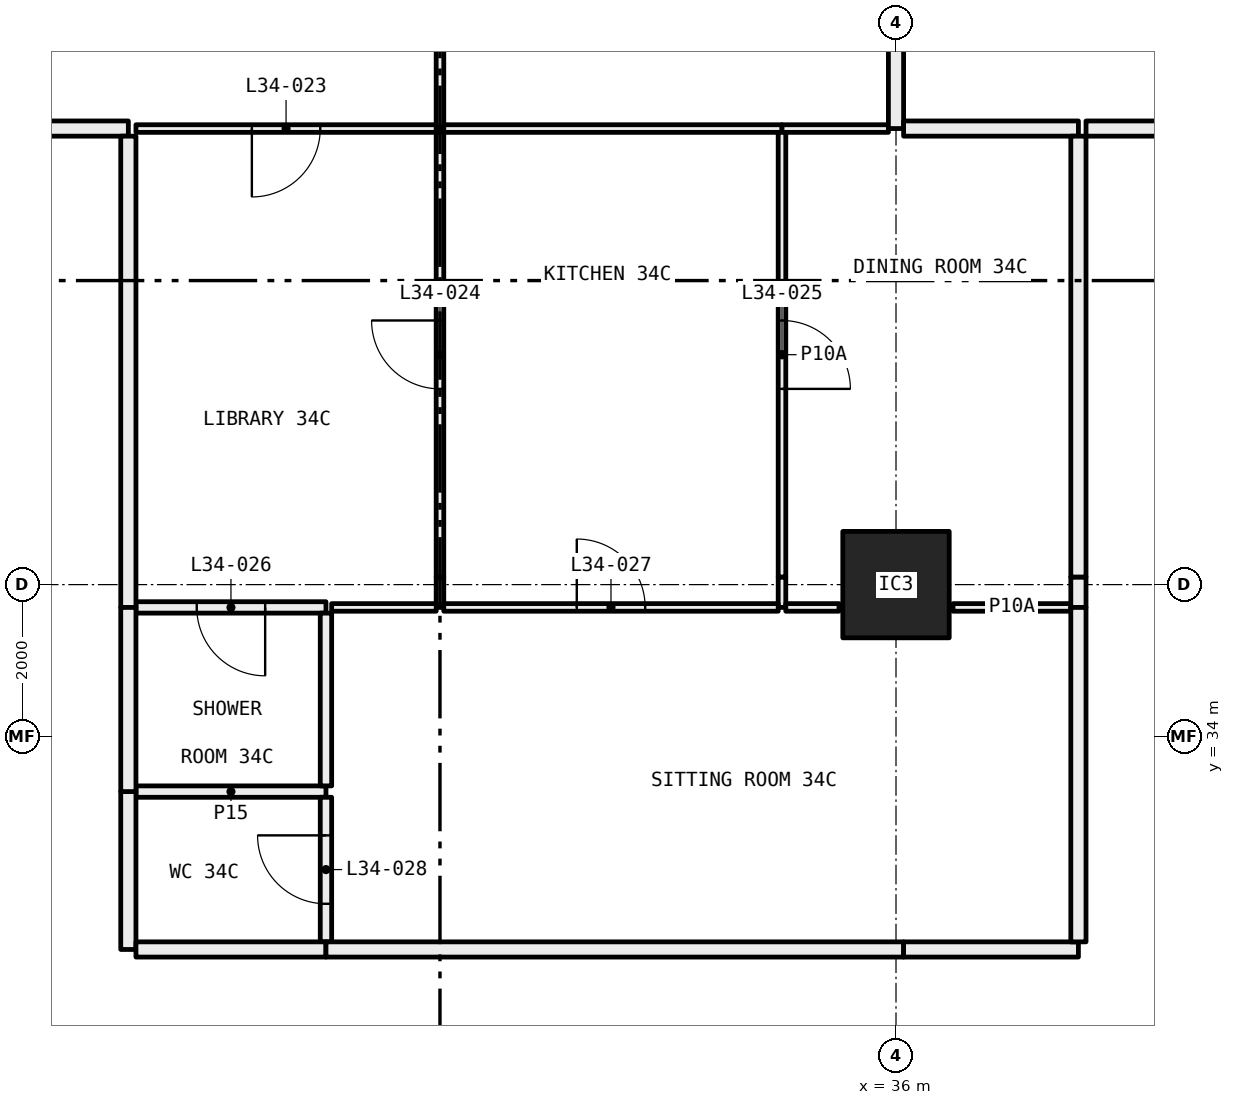
"""IFC4 building model, lengths in metres.
Left out: names, types, materials, properties, quantities, classifications, styles, units other than length and angle.
Written with IfcOpenShell. Run it as: python <this file> out.ifc"""

import sys

from ifc_helpers import new_model, si_unit, direction, frame, frame_2d, origin, origin_2d, place, context, subcontext, project, spatial, rectangle, hollow_rectangle, extrude, element, fill, save


model = new_model("IFC4")
c1 = context("Model", 3, precision=1e-05, world=origin(), true_north=direction((0.0, 1.0)))
c2 = subcontext(c1, "Body", "Model", "MODEL_VIEW")
j1 = project(units=[si_unit("LENGTHUNIT", "METRE"), si_unit("PLANEANGLEUNIT", "RADIAN")], contexts=[c1])
p1 = place(None, origin())
s1 = spatial("IfcSite", under=j1, at=p1, CompositionType="ELEMENT")
p2 = place(p1, origin())
s2 = spatial("IfcBuilding", under=s1, at=p2, CompositionType="ELEMENT")
p3 = place(p2, frame((0.0, 0.0, 131.1)))
s3 = spatial("IfcBuildingStorey", under=s2, at=p3, CompositionType="ELEMENT", Elevation=131.1)
p4 = place(p3, frame((36.0, 36.0, 0.0), z_axis=(0.0, 0.0, 1.0), x_axis=(1.0, 0.0, 0.0)))
e1 = element("IfcColumn", 1, at=p4, inside=s3, PredefinedType="COLUMN", context=c2, shape_type="SweptSolid", body=[
    extrude(hollow_rectangle(XDim=1.4, YDim=1.4, WallThickness=0.06, at=origin_2d()), origin(), (0.0, 0.0, 1.0), 3.05),
])
p5 = place(p3, frame((30.0, 42.0, 0.0), z_axis=(0.0, 0.0, 1.0), x_axis=(0.0, 1.0, 0.0)))
e2 = element("IfcWall", 2, at=p5, inside=s3, PredefinedType="PARTITIONING", context=c2, shape_type="SweptSolid", body=[
    extrude(rectangle(XDim=5.28, YDim=0.1, at=frame_2d((2.64, 0.0))), origin(), (0.0, 0.0, 1.0), 3.05),
])
p6 = place(p5, frame((2.19, 0.0, 0.0)))
e3 = element("IfcOpeningElement", 3, at=p6, cuts=e2, PredefinedType="OPENING", context=c2, shape_type="SweptSolid", body=[
    extrude(rectangle(XDim=0.9, YDim=2.1, at=frame_2d((0.45, 1.05))), frame((0.0, 0.06, 0.0), z_axis=(0.0, -1.0, 0.0), x_axis=(1.0, 0.0, 0.0)), (0.0, 0.0, 1.0), 0.12),
])
p7 = place(p3, frame((26.0, 42.0, 0.0), z_axis=(0.0, 0.0, 1.0), x_axis=(1.0, 0.0, 0.0)))
e4 = element("IfcWall", 4, at=p7, inside=s3, PredefinedType="PARTITIONING", context=c2, shape_type="SweptSolid", body=[
    extrude(rectangle(XDim=3.95, YDim=0.1, at=frame_2d((1.975, 0.0))), origin(), (0.0, 0.0, 1.0), 3.05),
])
p8 = place(p7, frame((1.525, 0.0, 0.0)))
e5 = element("IfcOpeningElement", 5, at=p8, cuts=e4, PredefinedType="OPENING", context=c2, shape_type="SweptSolid", body=[
    extrude(rectangle(XDim=0.9, YDim=2.1, at=frame_2d((0.45, 1.05))), frame((0.0, 0.06, 0.0), z_axis=(0.0, -1.0, 0.0), x_axis=(1.0, 0.0, 0.0)), (0.0, 0.0, 1.0), 0.12),
])
p9 = place(p3, frame((24.0, 42.0, 0.0), z_axis=(0.0, 0.0, 1.0), x_axis=(1.0, 0.0, 0.0)))
e6 = element("IfcWall", 6, at=p9, inside=s3, PredefinedType="PARTITIONING", context=c2, shape_type="SweptSolid", body=[
    extrude(rectangle(XDim=1.9, YDim=0.2, at=frame_2d((0.95, 0.0))), origin(), (0.0, 0.0, 1.0), 3.05),
])
p10 = place(p3, frame((30.05, 42.0, 0.0), z_axis=(0.0, 0.0, 1.0), x_axis=(1.0, 0.0, 0.0)))
e7 = element("IfcWall", 7, at=p10, inside=s3, PredefinedType="PARTITIONING", context=c2, shape_type="SweptSolid", body=[
    extrude(rectangle(XDim=4.45, YDim=0.1, at=frame_2d((2.225, 0.0))), origin(), (0.0, 0.0, 1.0), 3.05),
])
p11 = place(p3, frame((34.5, 42.0, 0.0), z_axis=(0.0, 0.0, 1.0), x_axis=(1.0, 0.0, 0.0)))
e8 = element("IfcWall", 8, at=p11, inside=s3, PredefinedType="PARTITIONING", context=c2, shape_type="SweptSolid", body=[
    extrude(rectangle(XDim=1.4, YDim=0.1, at=frame_2d((0.7, 0.0))), origin(), (0.0, 0.0, 1.0), 3.05),
])
p12 = place(p3, frame((36.0, 42.0, 0.0), z_axis=(0.0, 0.0, 1.0), x_axis=(0.0, 1.0, 0.0)))
e9 = element("IfcWall", 9, at=p12, inside=s3, PredefinedType="PARTITIONING", context=c2, shape_type="SweptSolid", body=[
    extrude(rectangle(XDim=5.28, YDim=0.2, at=frame_2d((2.64, 0.0))), origin(), (0.0, 0.0, 1.0), 2.45),
])
p13 = place(p3, frame((30.0, 35.7, 0.0), z_axis=(0.0, 0.0, 1.0), x_axis=(0.0, 1.0, 0.0)))
e10 = element("IfcWall", 10, at=p13, inside=s3, PredefinedType="PARTITIONING", context=c2, shape_type="SweptSolid", body=[
    extrude(rectangle(XDim=0.4, YDim=0.1, at=frame_2d((0.2, 0.0))), origin(), (0.0, 0.0, 1.0), 2.45),
])
p14 = place(p3, frame((30.0, 36.1, 0.0), z_axis=(0.0, 0.0, 1.0), x_axis=(0.0, 1.0, 0.0)))
e11 = element("IfcWall", 11, at=p14, inside=s3, PredefinedType="PARTITIONING", context=c2, shape_type="SweptSolid", body=[
    extrude(rectangle(XDim=5.85, YDim=0.1, at=frame_2d((2.925, 0.0))), origin(), (0.0, 0.0, 1.0), 3.05),
])
p15 = place(p14, frame((2.475, 0.0, 0.0)))
e12 = element("IfcOpeningElement", 12, at=p15, cuts=e11, PredefinedType="OPENING", context=c2, shape_type="SweptSolid", body=[
    extrude(rectangle(XDim=0.9, YDim=2.1, at=frame_2d((0.45, 1.05))), frame((0.0, 0.06, 0.0), z_axis=(0.0, -1.0, 0.0), x_axis=(1.0, 0.0, 0.0)), (0.0, 0.0, 1.0), 0.12),
])
p16 = place(p3, frame((26.0, 35.7, 0.0), z_axis=(0.0, 0.0, 1.0), x_axis=(1.0, 0.0, 0.0)))
e13 = element("IfcWall", 13, at=p16, inside=s3, PredefinedType="PARTITIONING", context=c2, shape_type="SweptSolid", body=[
    extrude(rectangle(XDim=2.5, YDim=0.15, at=frame_2d((1.25, 0.0))), origin(), (0.0, 0.0, 1.0), 3.05),
])
p17 = place(p16, frame((0.8, 0.0, 0.0)))
e14 = element("IfcOpeningElement", 14, at=p17, cuts=e13, PredefinedType="OPENING", context=c2, shape_type="SweptSolid", body=[
    extrude(rectangle(XDim=0.9, YDim=2.1, at=frame_2d((0.45, 1.05))), frame((0.0, 0.085, 0.0), z_axis=(0.0, -1.0, 0.0), x_axis=(1.0, 0.0, 0.0)), (0.0, 0.0, 1.0), 0.17),
])
p18 = place(p3, frame((28.575, 35.7, 0.0), z_axis=(0.0, 0.0, 1.0), x_axis=(1.0, 0.0, 0.0)))
e15 = element("IfcWall", 15, at=p18, inside=s3, PredefinedType="PARTITIONING", context=c2, shape_type="SweptSolid", body=[
    extrude(rectangle(XDim=1.375, YDim=0.1, at=frame_2d((0.688, 0.0))), origin(), (0.0, 0.0, 1.0), 3.05),
])
p19 = place(p3, frame((25.9, 41.9, 0.0), z_axis=(0.0, 0.0, 1.0), x_axis=(0.0, -1.0, 0.0)))
e16 = element("IfcWall", 16, at=p19, inside=s3, PredefinedType="PARTITIONING", context=c2, shape_type="SweptSolid", body=[
    extrude(rectangle(XDim=6.2, YDim=0.2, at=frame_2d((3.1, 0.0))), origin(), (0.0, 0.0, 1.0), 2.45),
])
p20 = place(p3, frame((34.5, 35.7, 0.0), z_axis=(0.0, 0.0, 1.0), x_axis=(0.0, 1.0, 0.0)))
e17 = element("IfcWall", 17, at=p20, inside=s3, PredefinedType="PARTITIONING", context=c2, shape_type="SweptSolid", body=[
    extrude(rectangle(XDim=0.4, YDim=0.1, at=frame_2d((0.2, 0.0))), origin(), (0.0, 0.0, 1.0), 2.45),
])
p21 = place(p3, frame((34.5, 36.1, 0.0), z_axis=(0.0, 0.0, 1.0), x_axis=(0.0, 1.0, 0.0)))
e18 = element("IfcWall", 18, at=p21, inside=s3, PredefinedType="PARTITIONING", context=c2, shape_type="SweptSolid", body=[
    extrude(rectangle(XDim=5.85, YDim=0.1, at=frame_2d((2.925, 0.0))), origin(), (0.0, 0.0, 1.0), 3.05),
])
p22 = place(p21, frame((2.475, 0.0, 0.0)))
e19 = element("IfcOpeningElement", 19, at=p22, cuts=e18, PredefinedType="OPENING", context=c2, shape_type="SweptSolid", body=[
    extrude(rectangle(XDim=0.9, YDim=2.1, at=frame_2d((0.45, 1.05))), frame((0.0, 0.06, 0.0), z_axis=(0.0, -1.0, 0.0), x_axis=(1.0, 0.0, 0.0)), (0.0, 0.0, 1.0), 0.12),
])
p23 = place(p3, frame((30.05, 35.7, 0.0), z_axis=(0.0, 0.0, 1.0), x_axis=(1.0, 0.0, 0.0)))
e20 = element("IfcWall", 20, at=p23, inside=s3, PredefinedType="PARTITIONING", context=c2, shape_type="SweptSolid", body=[
    extrude(rectangle(XDim=4.4, YDim=0.1, at=frame_2d((2.2, 0.0))), origin(), (0.0, 0.0, 1.0), 3.05),
])
p24 = place(p23, frame((1.75, 0.0, 0.0)))
e21 = element("IfcOpeningElement", 21, at=p24, cuts=e20, PredefinedType="OPENING", context=c2, shape_type="SweptSolid", body=[
    extrude(rectangle(XDim=0.9, YDim=2.1, at=frame_2d((0.45, 1.05))), frame((0.0, 0.06, 0.0), z_axis=(0.0, -1.0, 0.0), x_axis=(1.0, 0.0, 0.0)), (0.0, 0.0, 1.0), 0.12),
])
p25 = place(p3, frame((34.55, 35.7, 0.0), z_axis=(0.0, 0.0, 1.0), x_axis=(1.0, 0.0, 0.0)))
e22 = element("IfcWall", 22, at=p25, inside=s3, PredefinedType="PARTITIONING", context=c2, shape_type="SweptSolid", body=[
    extrude(rectangle(XDim=0.7, YDim=0.1, at=frame_2d((0.35, 0.0))), origin(), (0.0, 0.0, 1.0), 3.05),
])
p26 = place(p3, frame((36.75, 35.7, 0.0), z_axis=(0.0, 0.0, 1.0), x_axis=(1.0, 0.0, 0.0)))
e23 = element("IfcWall", 23, at=p26, inside=s3, PredefinedType="PARTITIONING", context=c2, shape_type="SweptSolid", body=[
    extrude(rectangle(XDim=1.55, YDim=0.1, at=frame_2d((0.775, 0.0))), origin(), (0.0, 0.0, 1.0), 3.05),
])
p27 = place(p3, frame((38.4, 42.0, 0.0), z_axis=(0.0, 0.0, 1.0), x_axis=(-1.0, 0.0, 0.0)))
e24 = element("IfcWall", 24, at=p27, inside=s3, PredefinedType="PARTITIONING", context=c2, shape_type="SweptSolid", body=[
    extrude(rectangle(XDim=2.3, YDim=0.2, at=frame_2d((1.15, 0.0))), origin(), (0.0, 0.0, 1.0), 3.05),
])
p28 = place(p3, frame((38.4, 35.7, 0.0), z_axis=(0.0, 0.0, 1.0), x_axis=(0.0, 1.0, 0.0)))
e25 = element("IfcWall", 25, at=p28, inside=s3, PredefinedType="PARTITIONING", context=c2, shape_type="SweptSolid", body=[
    extrude(rectangle(XDim=0.4, YDim=0.2, at=frame_2d((0.2, 0.0))), origin(), (0.0, 0.0, 1.0), 2.45),
])
p29 = place(p3, frame((38.4, 36.1, 0.0), z_axis=(0.0, 0.0, 1.0), x_axis=(0.0, 1.0, 0.0)))
e26 = element("IfcWall", 26, at=p29, inside=s3, PredefinedType="PARTITIONING", context=c2, shape_type="SweptSolid", body=[
    extrude(rectangle(XDim=5.8, YDim=0.2, at=frame_2d((2.9, 0.0))), origin(), (0.0, 0.0, 1.0), 3.05),
])
p30 = place(p3, frame((28.5, 33.277, 0.0), z_axis=(0.0, 0.0, 1.0), x_axis=(-1.0, 0.0, 0.0)))
e27 = element("IfcWall", 27, at=p30, inside=s3, PredefinedType="PARTITIONING", context=c2, shape_type="SweptSolid", body=[
    extrude(rectangle(XDim=2.5, YDim=0.15, at=frame_2d((1.25, 0.0))), origin(), (0.0, 0.0, 1.0), 3.05),
])
p31 = place(p3, frame((28.5, 31.3, 0.0), z_axis=(0.0, 0.0, 1.0), x_axis=(0.0, 1.0, 0.0)))
e28 = element("IfcWall", 28, at=p31, inside=s3, PredefinedType="PARTITIONING", context=c2, shape_type="SweptSolid", body=[
    extrude(rectangle(XDim=1.902, YDim=0.15, at=frame_2d((0.951, 0.0))), origin(), (0.0, 0.0, 1.0), 3.05),
])
p32 = place(p31, frame((0.501, 0.0, 0.0)))
e29 = element("IfcOpeningElement", 29, at=p32, cuts=e28, PredefinedType="OPENING", context=c2, shape_type="SweptSolid", body=[
    extrude(rectangle(XDim=0.9, YDim=2.1, at=frame_2d((0.45, 1.05))), frame((0.0, 0.085, 0.0), z_axis=(0.0, -1.0, 0.0), x_axis=(1.0, 0.0, 0.0)), (0.0, 0.0, 1.0), 0.17),
])
p33 = place(p3, frame((25.9, 33.277, 0.0), z_axis=(0.0, 0.0, 1.0), x_axis=(0.0, -1.0, 0.0)))
e30 = element("IfcWall", 30, at=p33, inside=s3, PredefinedType="PARTITIONING", context=c2, shape_type="SweptSolid", body=[
    extrude(rectangle(XDim=2.077, YDim=0.2, at=frame_2d((1.039, 0.0))), origin(), (0.0, 0.0, 1.0), 3.05),
])
p34 = place(p3, frame((26.0, 31.2, 0.0), z_axis=(0.0, 0.0, 1.0), x_axis=(1.0, 0.0, 0.0)))
e31 = element("IfcWall", 31, at=p34, inside=s3, PredefinedType="PARTITIONING", context=c2, shape_type="SweptSolid", body=[
    extrude(rectangle(XDim=2.5, YDim=0.2, at=frame_2d((1.25, 0.0))), origin(), (0.0, 0.0, 1.0), 3.05),
])
p35 = place(p3, frame((28.5, 33.352, 0.0), z_axis=(0.0, 0.0, 1.0), x_axis=(0.0, 1.0, 0.0)))
e32 = element("IfcWall", 32, at=p35, inside=s3, PredefinedType="PARTITIONING", context=c2, shape_type="SweptSolid", body=[
    extrude(rectangle(XDim=2.273, YDim=0.15, at=frame_2d((1.136, 0.0))), origin(), (0.0, 0.0, 1.0), 3.05),
])
p36 = place(p3, frame((25.9, 35.7, 0.0), z_axis=(0.0, 0.0, 1.0), x_axis=(0.0, -1.0, 0.0)))
e33 = element("IfcWall", 33, at=p36, inside=s3, PredefinedType="PARTITIONING", context=c2, shape_type="SweptSolid", body=[
    extrude(rectangle(XDim=2.423, YDim=0.2, at=frame_2d((1.211, 0.0))), origin(), (0.0, 0.0, 1.0), 3.05),
])
p37 = place(p3, frame((28.5, 31.2, 0.0), z_axis=(0.0, 0.0, 1.0), x_axis=(1.0, 0.0, 0.0)))
e34 = element("IfcWall", 34, at=p37, inside=s3, PredefinedType="PARTITIONING", context=c2, shape_type="SweptSolid", body=[
    extrude(rectangle(XDim=7.6, YDim=0.2, at=frame_2d((3.8, 0.0))), origin(), (0.0, 0.0, 1.0), 2.45),
])
p38 = place(p3, frame((36.1, 31.2, 0.0), z_axis=(0.0, 0.0, 1.0), x_axis=(1.0, 0.0, 0.0)))
e35 = element("IfcWall", 35, at=p38, inside=s3, PredefinedType="PARTITIONING", context=c2, shape_type="SweptSolid", body=[
    extrude(rectangle(XDim=2.3, YDim=0.2, at=frame_2d((1.15, 0.0))), origin(), (0.0, 0.0, 1.0), 3.05),
])
p39 = place(p3, frame((38.4, 31.3, 0.0), z_axis=(0.0, 0.0, 1.0), x_axis=(0.0, 1.0, 0.0)))
e36 = element("IfcWall", 36, at=p39, inside=s3, PredefinedType="PARTITIONING", context=c2, shape_type="SweptSolid", body=[
    extrude(rectangle(XDim=4.4, YDim=0.2, at=frame_2d((2.2, 0.0))), origin(), (0.0, 0.0, 1.0), 3.05),
])
p40 = place(p3, frame((38.5, 42.0, 0.0), z_axis=(0.0, 0.0, 1.0), x_axis=(1.0, 0.0, 0.0)))
e37 = element("IfcWall", 37, at=p40, inside=s3, PredefinedType="PARTITIONING", context=c2, shape_type="SweptSolid", body=[
    extrude(rectangle(XDim=2.3, YDim=0.2, at=frame_2d((1.15, 0.0))), origin(), (0.0, 0.0, 1.0), 3.05),
])
p41 = place(p8, frame((0.9, 0.0, 0.0), x_axis=(-1.0, 0.0, 0.0)))
e38 = element("IfcDoor", 38, at=p41, inside=s3, OperationType="SINGLE_SWING_LEFT", PredefinedType="DOOR", context=c2, shape_type="SweptSolid", body=[
    extrude(rectangle(XDim=0.9, YDim=2.1, at=frame_2d((0.45, 1.05))), frame((0.0, 0.025, 0.0), z_axis=(0.0, -1.0, 0.0), x_axis=(1.0, 0.0, 0.0)), (0.0, 0.0, 1.0), 0.05),
])
fill(e5, e38)
p42 = place(p15, origin())
e39 = element("IfcDoor", 39, at=p42, inside=s3, OperationType="SINGLE_SWING_LEFT", PredefinedType="DOOR", context=c2, shape_type="SweptSolid", body=[
    extrude(rectangle(XDim=0.9, YDim=2.1, at=frame_2d((0.45, 1.05))), frame((0.0, 0.025, 0.0), z_axis=(0.0, -1.0, 0.0), x_axis=(1.0, 0.0, 0.0)), (0.0, 0.0, 1.0), 0.05),
])
fill(e12, e39)
p43 = place(p22, frame((0.9, 0.0, 0.0), x_axis=(-1.0, 0.0, 0.0)))
e40 = element("IfcDoor", 40, at=p43, inside=s3, OperationType="SINGLE_SWING_LEFT", PredefinedType="DOOR", context=c2, shape_type="SweptSolid", body=[
    extrude(rectangle(XDim=0.9, YDim=2.1, at=frame_2d((0.45, 1.05))), frame((0.0, 0.025, 0.0), z_axis=(0.0, -1.0, 0.0), x_axis=(1.0, 0.0, 0.0)), (0.0, 0.0, 1.0), 0.05),
])
fill(e19, e40)
p44 = place(p17, frame((0.9, 0.0, 0.0), x_axis=(-1.0, 0.0, 0.0)))
e41 = element("IfcDoor", 41, at=p44, inside=s3, OperationType="SINGLE_SWING_RIGHT", PredefinedType="DOOR", context=c2, shape_type="SweptSolid", body=[
    extrude(rectangle(XDim=0.9, YDim=2.1, at=frame_2d((0.45, 1.05))), frame((0.0, 0.025, 0.0), z_axis=(0.0, -1.0, 0.0), x_axis=(1.0, 0.0, 0.0)), (0.0, 0.0, 1.0), 0.05),
])
fill(e14, e41)
p45 = place(p24, origin())
e42 = element("IfcDoor", 42, at=p45, inside=s3, OperationType="SINGLE_SWING_RIGHT", PredefinedType="DOOR", context=c2, shape_type="SweptSolid", body=[
    extrude(rectangle(XDim=0.9, YDim=2.1, at=frame_2d((0.45, 1.05))), frame((0.0, 0.025, 0.0), z_axis=(0.0, -1.0, 0.0), x_axis=(1.0, 0.0, 0.0)), (0.0, 0.0, 1.0), 0.05),
])
fill(e21, e42)
p46 = place(p32, origin())
e43 = element("IfcDoor", 43, at=p46, inside=s3, OperationType="SINGLE_SWING_LEFT", PredefinedType="DOOR", context=c2, shape_type="SweptSolid", body=[
    extrude(rectangle(XDim=0.9, YDim=2.1, at=frame_2d((0.45, 1.05))), frame((0.0, 0.025, 0.0), z_axis=(0.0, -1.0, 0.0), x_axis=(1.0, 0.0, 0.0)), (0.0, 0.0, 1.0), 0.05),
])
fill(e29, e43)
save(model, sys.argv[1])
